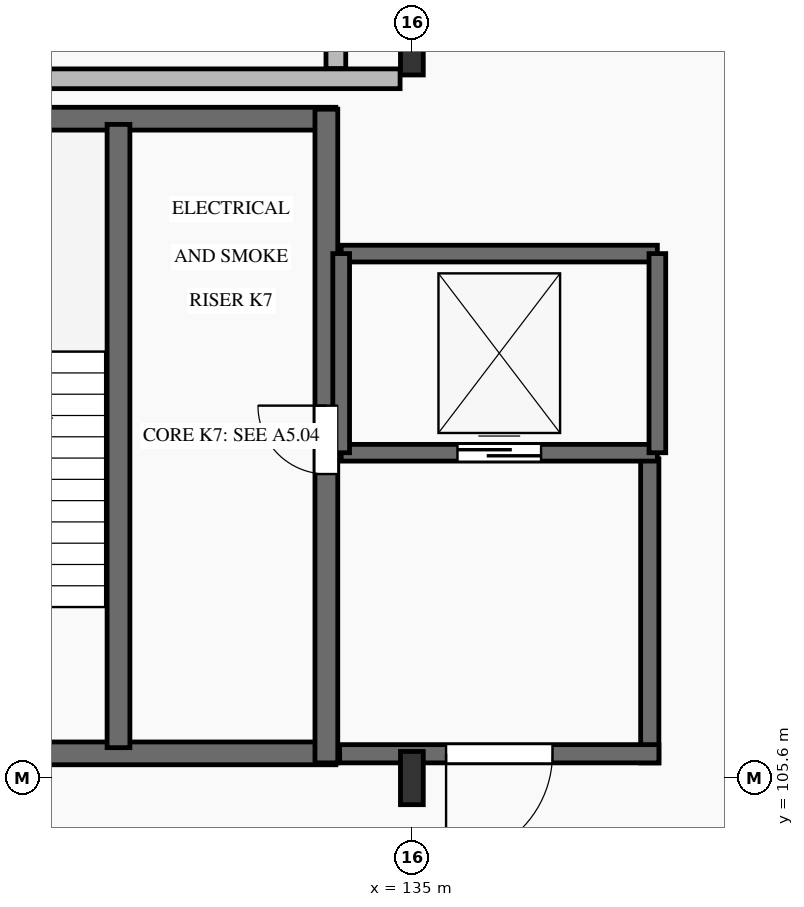
"""IFC4 building model, lengths in metres.
Left out: names, types, materials, properties, quantities, classifications, styles, units other than length and angle.
Written with IfcOpenShell. Run it as: python <this file> out.ifc"""

import sys

from ifc_helpers import new_model, si_unit, direction, frame, frame_2d, origin, origin_2d, place, context, subcontext, project, spatial, rectangle, i_section, extrude, element, fill, save


model = new_model("IFC4")
c1 = context("Model", 3, precision=1e-05, world=origin(), true_north=direction((0.0, 1.0)))
c2 = subcontext(c1, "Body", "Model", "MODEL_VIEW")
j1 = project(units=[si_unit("LENGTHUNIT", "METRE"), si_unit("PLANEANGLEUNIT", "RADIAN")], contexts=[c1])
p1 = place(None, origin())
s1 = spatial("IfcSite", under=j1, at=p1, CompositionType="ELEMENT")
p2 = place(p1, origin())
s2 = spatial("IfcBuilding", under=s1, at=p2, CompositionType="ELEMENT")
p3 = place(p2, frame((0.0, 0.0, -4.5)))
s3 = spatial("IfcBuildingStorey", under=s2, at=p3, CompositionType="ELEMENT", Elevation=-4.5)
for number, where, z_axis, x_axis in (
    (1, (135.0, 105.6, 0.0), (0.0, 0.0, 1.0), (1.0, 0.0, 0.0)),
    (2, (135.0, 115.2, 0.0), (0.0, 0.0, 1.0), (1.0, 0.0, 0.0)),
):
    element("IfcColumn", number, at=place(p3, frame(where, z_axis=z_axis, x_axis=x_axis)), inside=s3, PredefinedType="COLUMN", context=c2, shape_type="SweptSolid", body=[
        extrude(i_section(OverallWidth=0.3, OverallDepth=0.7, WebThickness=0.017, FlangeThickness=0.032, FilletRadius=0.027, at=origin_2d()), origin(), (0.0, 0.0, 1.0), 4.5),
    ])
p4 = place(p3, frame((127.0, 105.925, 0.0), z_axis=(0.0, 0.0, 1.0), x_axis=(1.0, 0.0, 0.0)))
e3 = element("IfcWall", 3, at=p4, inside=s3, PredefinedType="SHEAR", context=c2, shape_type="SweptSolid", body=[
    extrude(rectangle(XDim=7.0, YDim=0.3, at=frame_2d((3.5, 0.0))), origin(), (0.0, 0.0, 1.0), 4.5),
])
p5 = place(p4, frame((1.25, 0.0, 0.0)))
e4 = element("IfcOpeningElement", 4, at=p5, cuts=e3, PredefinedType="OPENING", context=c2, shape_type="SweptSolid", body=[
    extrude(rectangle(XDim=1.2, YDim=2.15, at=frame_2d((0.6, 1.075))), frame((0.0, 0.165, 0.0), z_axis=(0.0, -1.0, 0.0), x_axis=(1.0, 0.0, 0.0)), (0.0, 0.0, 1.0), 0.33),
])
p6 = place(p3, frame((127.0, 114.275, 0.0), z_axis=(0.0, 0.0, 1.0), x_axis=(1.0, 0.0, 0.0)))
e5 = element("IfcWall", 5, at=p6, inside=s3, PredefinedType="SHEAR", context=c2, shape_type="SweptSolid", body=[
    extrude(rectangle(XDim=7.0, YDim=0.3, at=frame_2d((3.5, 0.0))), origin(), (0.0, 0.0, 1.0), 4.5),
])
p7 = place(p3, frame((133.875, 105.8, 0.0), z_axis=(0.0, 0.0, 1.0), x_axis=(0.0, 1.0, 0.0)))
e6 = element("IfcWall", 6, at=p7, inside=s3, PredefinedType="SHEAR", context=c2, shape_type="SweptSolid", body=[
    extrude(rectangle(XDim=8.6, YDim=0.3, at=frame_2d((4.3, 0.0))), origin(), (0.0, 0.0, 1.0), 4.5),
])
p8 = place(p7, frame((3.8, 0.0, 0.0)))
e7 = element("IfcOpeningElement", 7, at=p8, cuts=e6, PredefinedType="OPENING", context=c2, shape_type="SweptSolid", body=[
    extrude(rectangle(XDim=0.9, YDim=2.05, at=frame_2d((0.45, 1.025))), frame((0.0, 0.165, 0.0), z_axis=(0.0, -1.0, 0.0), x_axis=(1.0, 0.0, 0.0)), (0.0, 0.0, 1.0), 0.33),
])
p9 = place(p3, frame((131.14, 106.0, 0.0), z_axis=(0.0, 0.0, 1.0), x_axis=(0.0, 1.0, 0.0)))
e8 = element("IfcWall", 8, at=p9, inside=s3, PredefinedType="SHEAR", context=c2, shape_type="SweptSolid", body=[
    extrude(rectangle(XDim=8.2, YDim=0.3, at=frame_2d((4.1, 0.0))), origin(), (0.0, 0.0, 1.0), 4.5),
])
p10 = place(p3, frame((138.13, 105.8, 0.0), z_axis=(0.0, 0.0, 1.0), x_axis=(0.0, 1.0, 0.0)))
e9 = element("IfcWall", 9, at=p10, inside=s3, PredefinedType="SHEAR", context=c2, shape_type="SweptSolid", body=[
    extrude(rectangle(XDim=4.0, YDim=0.24, at=frame_2d((2.0, 0.0))), origin(), (0.0, 0.0, 1.0), 4.5),
])
p11 = place(p3, frame((134.05, 105.92, 0.0), z_axis=(0.0, 0.0, 1.0), x_axis=(1.0, 0.0, 0.0)))
e10 = element("IfcWall", 10, at=p11, inside=s3, PredefinedType="SHEAR", context=c2, shape_type="SweptSolid", body=[
    extrude(rectangle(XDim=4.2, YDim=0.24, at=frame_2d((2.1, 0.0))), origin(), (0.0, 0.0, 1.0), 4.5),
])
p12 = place(p11, frame((1.4, 0.0, 0.0)))
e11 = element("IfcOpeningElement", 11, at=p12, cuts=e10, PredefinedType="OPENING", context=c2, shape_type="SweptSolid", body=[
    extrude(rectangle(XDim=1.4, YDim=2.2, at=frame_2d((0.7, 1.1))), frame((0.0, 0.135, 0.0), z_axis=(0.0, -1.0, 0.0), x_axis=(1.0, 0.0, 0.0)), (0.0, 0.0, 1.0), 0.27),
])
p13 = place(p3, frame((134.07, 109.88, 0.0), z_axis=(0.0, 0.0, 1.0), x_axis=(1.0, 0.0, 0.0)))
e12 = element("IfcWall", 12, at=p13, inside=s3, PredefinedType="SHEAR", context=c2, shape_type="SweptSolid", body=[
    extrude(rectangle(XDim=4.16, YDim=0.22, at=frame_2d((2.08, 0.0))), origin(), (0.0, 0.0, 1.0), 4.5),
])
p14 = place(p13, frame((1.53, 0.0, 0.0)))
e13 = element("IfcOpeningElement", 13, at=p14, cuts=e12, PredefinedType="OPENING", context=c2, shape_type="SweptSolid", body=[
    extrude(rectangle(XDim=1.1, YDim=2.15, at=frame_2d((0.55, 1.075))), frame((0.0, 0.125, 0.0), z_axis=(0.0, -1.0, 0.0), x_axis=(1.0, 0.0, 0.0)), (0.0, 0.0, 1.0), 0.25),
])
p15 = place(p3, frame((134.07, 112.5, 0.0), z_axis=(0.0, 0.0, 1.0), x_axis=(1.0, 0.0, 0.0)))
e14 = element("IfcWall", 14, at=p15, inside=s3, PredefinedType="SHEAR", context=c2, shape_type="SweptSolid", body=[
    extrude(rectangle(XDim=4.16, YDim=0.22, at=frame_2d((2.08, 0.0))), origin(), (0.0, 0.0, 1.0), 4.5),
])
for number, where, z_axis, x_axis in (
    (15, (134.07, 109.88, 0.0), (0.0, 0.0, 1.0), (0.0, 1.0, 0.0)),
    (16, (138.23, 109.88, 0.0), (0.0, 0.0, 1.0), (0.0, 1.0, 0.0)),
):
    element("IfcWall", number, at=place(p3, frame(where, z_axis=z_axis, x_axis=x_axis)), inside=s3, PredefinedType="SHEAR", context=c2, shape_type="SweptSolid", body=[
        extrude(rectangle(XDim=2.62, YDim=0.22, at=frame_2d((1.31, 0.0))), origin(), (0.0, 0.0, 1.0), 4.5),
    ])
p16 = place(p3, frame((117.75, 114.8, 0.0), z_axis=(0.0, 0.0, 1.0), x_axis=(1.0, 0.0, 0.0)))
e17 = element("IfcWall", 17, at=p16, inside=s3, PredefinedType="PARTITIONING", context=c2, shape_type="SweptSolid", body=[
    extrude(rectangle(XDim=17.095, YDim=0.26, at=frame_2d((8.547, 0.0))), origin(), (0.0, 0.0, 1.0), 3.61),
])
p17 = place(p16, frame((5.2, 0.0, 0.0)))
e18 = element("IfcOpeningElement", 18, at=p17, cuts=e17, PredefinedType="OPENING", context=c2, shape_type="SweptSolid", body=[
    extrude(rectangle(XDim=1.5, YDim=2.25, at=frame_2d((0.75, 1.125))), frame((0.0, 0.145, 0.0), z_axis=(0.0, -1.0, 0.0), x_axis=(1.0, 0.0, 0.0)), (0.0, 0.0, 1.0), 0.29),
])
p18 = place(p3, frame((134.0, 114.935, 0.0), z_axis=(0.0, 0.0, 1.0), x_axis=(0.0, 1.0, 0.0)))
e19 = element("IfcWall", 19, at=p18, inside=s3, PredefinedType="PARTITIONING", context=c2, shape_type="SweptSolid", body=[
    extrude(rectangle(XDim=9.39, YDim=0.26, at=frame_2d((4.695, 0.0))), origin(), (0.0, 0.0, 1.0), 4.2),
])
p19 = place(p8, origin())
e20 = element("IfcDoor", 20, at=p19, inside=s3, OperationType="SINGLE_SWING_RIGHT", PredefinedType="DOOR", context=c2, shape_type="SweptSolid", body=[
    extrude(rectangle(XDim=0.9, YDim=2.05, at=frame_2d((0.45, 1.025))), frame((0.0, 0.025, 0.0), z_axis=(0.0, -1.0, 0.0), x_axis=(1.0, 0.0, 0.0)), (0.0, 0.0, 1.0), 0.05),
])
fill(e7, e20)
p20 = place(p12, frame((1.4, 0.0, 0.0), z_axis=(0.0, 0.0, 1.0), x_axis=(-1.0, 0.0, 0.0)))
e21 = element("IfcDoor", 21, at=p20, inside=s3, OperationType="SINGLE_SWING_LEFT", PredefinedType="DOOR", context=c2, shape_type="SweptSolid", body=[
    extrude(rectangle(XDim=1.4, YDim=2.2, at=frame_2d((0.7, 1.1))), frame((0.0, 0.025, 0.0), z_axis=(0.0, -1.0, 0.0), x_axis=(1.0, 0.0, 0.0)), (0.0, 0.0, 1.0), 0.05),
])
fill(e11, e21)
p21 = place(p14, origin())
e22 = element("IfcDoor", 22, at=p21, inside=s3, OperationType="SLIDING_TO_RIGHT", PredefinedType="DOOR", context=c2, shape_type="SweptSolid", body=[
    extrude(rectangle(XDim=1.1, YDim=2.15, at=frame_2d((0.55, 1.075))), frame((0.0, 0.025, 0.0), z_axis=(0.0, -1.0, 0.0), x_axis=(1.0, 0.0, 0.0)), (0.0, 0.0, 1.0), 0.05),
])
fill(e13, e22)
save(model, sys.argv[1])
